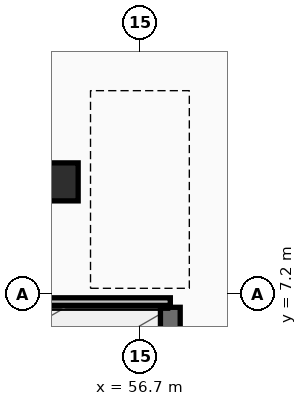
"""IFC4 building model, lengths in metres.
Left out: names, types, materials, properties, quantities, classifications, styles, units other than length and angle.
Written with IfcOpenShell. Run it as: python <this file> out.ifc"""

import sys

from ifc_helpers import new_model, si_unit, direction, frame, frame_2d, origin, origin_2d, place, context, subcontext, project, spatial, rectangle, hollow_rectangle, extrude, element, save


model = new_model("IFC4")
c1 = context("Model", 3, precision=1e-05, world=origin(), true_north=direction((0.0, 1.0)))
c2 = subcontext(c1, "Body", "Model", "MODEL_VIEW")
j1 = project(units=[si_unit("LENGTHUNIT", "METRE"), si_unit("PLANEANGLEUNIT", "RADIAN")], contexts=[c1])
p1 = place(None, origin())
s1 = spatial("IfcSite", under=j1, at=p1, CompositionType="ELEMENT")
p2 = place(p1, origin())
s2 = spatial("IfcBuilding", under=s1, at=p2, CompositionType="ELEMENT")
p3 = place(p2, frame((0.0, 0.0, -4.5)))
s3 = spatial("IfcBuildingStorey", under=s2, at=p3, CompositionType="ELEMENT", Elevation=-4.5)
p4 = place(p3, frame((57.5, 0.6, 0.0), z_axis=(0.0, 0.0, 1.0), x_axis=(0.0, 1.0, 0.0)))
e1 = element("IfcWall", 1, at=p4, inside=s3, PredefinedType="SOLIDWALL", context=c2, shape_type="SweptSolid", body=[
    extrude(rectangle(XDim=6.25, YDim=0.52, at=frame_2d((3.125, 0.0))), origin(), (0.0, 0.0, 1.0), 4.195),
])
p5 = place(p3, frame((54.675, 10.15, 0.0), z_axis=(0.0, 0.0, 1.0), x_axis=(1.0, 0.0, 0.0)))
e2 = element("IfcColumn", 2, at=p5, inside=s3, PredefinedType="COLUMN", context=c2, shape_type="SweptSolid", body=[
    extrude(hollow_rectangle(XDim=0.8, YDim=1.0, WallThickness=0.055, at=origin_2d()), origin(), (0.0, 0.0, 1.0), 4.5),
])
p6 = place(p3, frame((12.5, 7.0, 0.0), z_axis=(0.0, 0.0, 1.0), x_axis=(1.0, 0.0, 0.0)))
e3 = element("IfcWall", 3, at=p6, inside=s3, PredefinedType="PARTITIONING", context=c2, shape_type="SweptSolid", body=[
    extrude(rectangle(XDim=45.0, YDim=0.2, at=frame_2d((22.5, 0.0))), origin(), (0.0, 0.0, 1.0), 3.37),
])
save(model, sys.argv[1])
